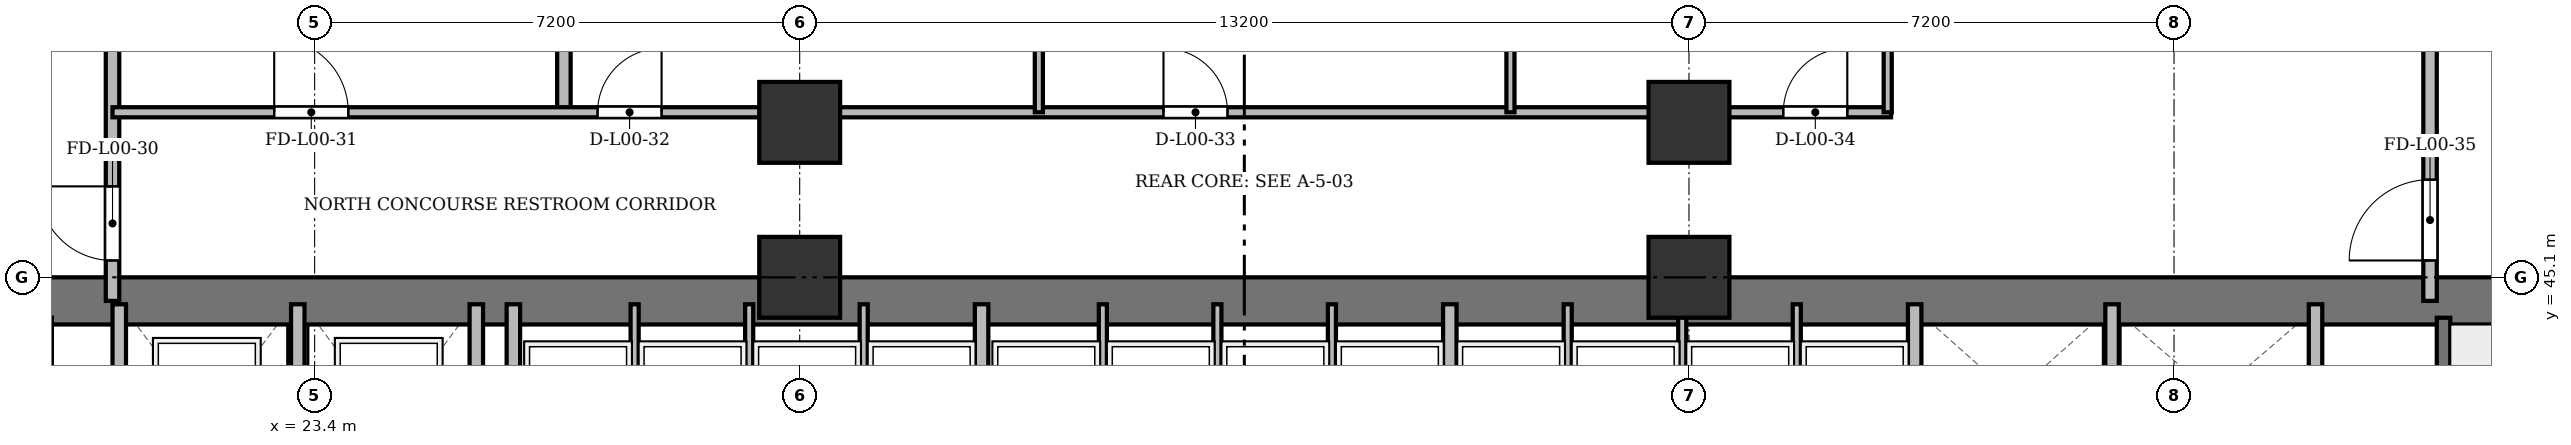
"""IFC4 building model, lengths in metres.
Left out: names, types, materials, properties, quantities, classifications, styles, units other than length and angle.
Written with IfcOpenShell. Run it as: python <this file> out.ifc"""

import sys

from ifc_helpers import new_model, si_unit, direction, frame, frame_2d, origin, origin_2d, place, context, subcontext, project, spatial, rectangle, extrude, source, transform, mapped, element, fill, save


model = new_model("IFC4")
c1 = context("Model", 3, precision=1e-05, world=origin(), true_north=direction((0.0, 1.0)))
c2 = subcontext(c1, "Body", "Model", "MODEL_VIEW")
j1 = project(units=[si_unit("LENGTHUNIT", "METRE"), si_unit("PLANEANGLEUNIT", "RADIAN")], contexts=[c1])
p1 = place(None, origin())
s1 = spatial("IfcSite", under=j1, at=p1, CompositionType="ELEMENT")
p2 = place(p1, origin())
s2 = spatial("IfcBuilding", under=s1, at=p2, CompositionType="ELEMENT")
p3 = place(p2, origin())
s3 = spatial("IfcBuildingStorey", under=s2, at=p3, CompositionType="ELEMENT", Elevation=0.0)
m1 = source(origin(), c2, "Body", "SweptSolid", [
    extrude(rectangle(XDim=1.2, YDim=1.2, at=origin_2d()), origin(), (0.0, 0.0, 1.0), 5.2),
])
for number, where, z_axis, x_axis in (
    (1, (30.6, 45.1, 0.0), (0.0, 0.0, 1.0), (1.0, 0.0, 0.0)),
    (2, (30.6, 47.4, 0.0), (0.0, 0.0, 1.0), (1.0, 0.0, 0.0)),
    (3, (43.8, 45.1, 0.0), (0.0, 0.0, 1.0), (1.0, 0.0, 0.0)),
    (4, (43.8, 47.4, 0.0), (0.0, 0.0, 1.0), (1.0, 0.0, 0.0)),
):
    element("IfcColumn", number, at=place(p3, frame(where, z_axis=z_axis, x_axis=x_axis)), inside=s3, PredefinedType="COLUMN", context=c2, shape_type="MappedRepresentation", body=[
        mapped(m1, transform((0.0, 0.0, 0.0), x_axis=(1.0, 0.0, 0.0), y_axis=(0.0, 1.0, 0.0), z_axis=(0.0, 0.0, 1.0), scale=1.0)),
    ])
p4 = place(p3, frame((15.5, 44.75, 0.0), z_axis=(0.0, 0.0, 1.0), x_axis=(1.0, 0.0, 0.0)))
e5 = element("IfcWall", 5, at=p4, inside=s3, PredefinedType="SHEAR", context=c2, shape_type="SweptSolid", body=[
    extrude(rectangle(XDim=43.4, YDim=0.7, at=frame_2d((21.7, 0.0))), origin(), (0.0, 0.0, 1.0), 4.88),
])
p5 = place(p3, frame((55.0, 33.4, 0.0), z_axis=(0.0, 0.0, 1.0), x_axis=(0.0, 1.0, 0.0)))
e6 = element("IfcWall", 6, at=p5, inside=s3, PredefinedType="SHEAR", context=c2, shape_type="SweptSolid", body=[
    extrude(rectangle(XDim=11.1, YDim=0.2, at=frame_2d((5.55, 0.0))), origin(), (0.0, 0.0, 1.0), 4.88),
])
p6 = place(p5, frame((0.85, 0.0, 0.0)))
e7 = element("IfcOpeningElement", 7, at=p6, cuts=e6, PredefinedType="OPENING", context=c2, shape_type="SweptSolid", body=[
    extrude(rectangle(XDim=1.1, YDim=2.15, at=frame_2d((0.55, 1.075))), frame((0.0, 0.11, 0.0), z_axis=(0.0, -1.0, 0.0), x_axis=(1.0, 0.0, 0.0)), (0.0, 0.0, 1.0), 0.22),
])
for number, where, z_axis, x_axis in (
    (8, (20.5, 41.3, 0.0), (0.0, 0.0, 1.0), (0.0, 1.0, 0.0)),
    (9, (23.15, 41.3, 0.0), (0.0, 0.0, 1.0), (0.0, 1.0, 0.0)),
    (10, (25.8, 41.3, 0.0), (0.0, 0.0, 1.0), (0.0, 1.0, 0.0)),
):
    element("IfcWall", number, at=place(p3, frame(where, z_axis=z_axis, x_axis=x_axis)), inside=s3, PredefinedType="SOLIDWALL", context=c2, shape_type="SweptSolid", body=[
        extrude(rectangle(XDim=3.4, YDim=0.2, at=frame_2d((1.7, 0.0))), origin(), (0.0, 0.0, 1.0), 4.88),
    ])
p7 = place(p3, frame((26.35, 33.4, 0.0), z_axis=(0.0, 0.0, 1.0), x_axis=(0.0, 1.0, 0.0)))
e11 = element("IfcWall", 11, at=p7, inside=s3, PredefinedType="SOLIDWALL", context=c2, shape_type="SweptSolid", body=[
    extrude(rectangle(XDim=11.3, YDim=0.2, at=frame_2d((5.65, 0.0))), origin(), (0.0, 0.0, 1.0), 3.78),
])
p8 = place(p3, frame((33.3, 41.5, 0.0), z_axis=(0.0, 0.0, 1.0), x_axis=(0.0, 1.0, 0.0)))
e12 = element("IfcWall", 12, at=p8, inside=s3, PredefinedType="SOLIDWALL", context=c2, shape_type="SweptSolid", body=[
    extrude(rectangle(XDim=3.2, YDim=0.2, at=frame_2d((1.6, 0.0))), origin(), (0.0, 0.0, 1.0), 4.88),
])
for number, where, z_axis, x_axis in (
    (13, (28.15, 41.5, 0.0), (0.0, 0.0, 1.0), (0.0, 1.0, 0.0)),
    (14, (29.85, 41.5, 0.0), (0.0, 0.0, 1.0), (0.0, 1.0, 0.0)),
    (15, (31.55, 41.5, 0.0), (0.0, 0.0, 1.0), (0.0, 1.0, 0.0)),
    (16, (35.1, 41.5, 0.0), (0.0, 0.0, 1.0), (0.0, 1.0, 0.0)),
    (17, (36.8, 41.5, 0.0), (0.0, 0.0, 1.0), (0.0, 1.0, 0.0)),
    (18, (38.5, 41.5, 0.0), (0.0, 0.0, 1.0), (0.0, 1.0, 0.0)),
):
    element("IfcWall", number, at=place(p3, frame(where, z_axis=z_axis, x_axis=x_axis)), inside=s3, PredefinedType="PARTITIONING", context=c2, shape_type="SweptSolid", body=[
        extrude(rectangle(XDim=3.2, YDim=0.12, at=frame_2d((1.6, 0.0))), origin(), (0.0, 0.0, 1.0), 4.88),
    ])
p9 = place(p3, frame((40.25, 41.5, 0.0), z_axis=(0.0, 0.0, 1.0), x_axis=(0.0, 1.0, 0.0)))
e19 = element("IfcWall", 19, at=p9, inside=s3, PredefinedType="SOLIDWALL", context=c2, shape_type="SweptSolid", body=[
    extrude(rectangle(XDim=3.2, YDim=0.2, at=frame_2d((1.6, 0.0))), origin(), (0.0, 0.0, 1.0), 4.88),
])
p10 = place(p3, frame((42.0, 41.5, 0.0), z_axis=(0.0, 0.0, 1.0), x_axis=(0.0, 1.0, 0.0)))
e20 = element("IfcWall", 20, at=p10, inside=s3, PredefinedType="PARTITIONING", context=c2, shape_type="SweptSolid", body=[
    extrude(rectangle(XDim=3.2, YDim=0.12, at=frame_2d((1.6, 0.0))), origin(), (0.0, 0.0, 1.0), 4.88),
])
p11 = place(p3, frame((43.7, 41.5, 0.0), z_axis=(0.0, 0.0, 1.0), x_axis=(0.0, 1.0, 0.0)))
e21 = element("IfcWall", 21, at=p11, inside=s3, PredefinedType="PARTITIONING", context=c2, shape_type="SweptSolid", body=[
    extrude(rectangle(XDim=3.2, YDim=0.12, at=frame_2d((1.6, 0.0))), origin(), (0.0, 0.0, 1.0), 4.08),
])
p12 = place(p3, frame((45.4, 41.5, 0.0), z_axis=(0.0, 0.0, 1.0), x_axis=(0.0, 1.0, 0.0)))
e22 = element("IfcWall", 22, at=p12, inside=s3, PredefinedType="PARTITIONING", context=c2, shape_type="SweptSolid", body=[
    extrude(rectangle(XDim=3.2, YDim=0.12, at=frame_2d((1.6, 0.0))), origin(), (0.0, 0.0, 1.0), 4.88),
])
p13 = place(p3, frame((47.15, 33.4, 0.0), z_axis=(0.0, 0.0, 1.0), x_axis=(0.0, 1.0, 0.0)))
e23 = element("IfcWall", 23, at=p13, inside=s3, PredefinedType="SOLIDWALL", context=c2, shape_type="SweptSolid", body=[
    extrude(rectangle(XDim=11.3, YDim=0.2, at=frame_2d((5.65, 0.0))), origin(), (0.0, 0.0, 1.0), 3.78),
])
for number, where, z_axis, x_axis in (
    (24, (50.08, 42.05, 0.0), (0.0, 0.0, 1.0), (0.0, 1.0, 0.0)),
    (25, (53.1, 42.05, 0.0), (0.0, 0.0, 1.0), (0.0, 1.0, 0.0)),
):
    element("IfcWall", number, at=place(p3, frame(where, z_axis=z_axis, x_axis=x_axis)), inside=s3, PredefinedType="SOLIDWALL", context=c2, shape_type="SweptSolid", body=[
        extrude(rectangle(XDim=2.65, YDim=0.2, at=frame_2d((1.325, 0.0))), origin(), (0.0, 0.0, 1.0), 4.88),
    ])
p14 = place(p3, frame((20.4, 44.75, 0.0), z_axis=(0.0, 0.0, 1.0), x_axis=(0.0, 1.0, 0.0)))
e26 = element("IfcWall", 26, at=p14, inside=s3, PredefinedType="PARTITIONING", context=c2, shape_type="SweptSolid", body=[
    extrude(rectangle(XDim=6.65, YDim=0.2, at=frame_2d((3.325, 0.0))), origin(), (0.0, 0.0, 1.0), 3.78),
])
p15 = place(p14, frame((0.6, 0.0, 0.0)))
e27 = element("IfcOpeningElement", 27, at=p15, cuts=e26, PredefinedType="OPENING", context=c2, shape_type="SweptSolid", body=[
    extrude(rectangle(XDim=1.1, YDim=2.15, at=frame_2d((0.55, 1.075))), frame((0.0, 0.11, 0.0), z_axis=(0.0, -1.0, 0.0), x_axis=(1.0, 0.0, 0.0)), (0.0, 0.0, 1.0), 0.22),
])
p16 = place(p3, frame((27.1, 47.55, 0.0), z_axis=(0.0, 0.0, 1.0), x_axis=(0.0, 1.0, 0.0)))
e28 = element("IfcWall", 28, at=p16, inside=s3, PredefinedType="PARTITIONING", context=c2, shape_type="SweptSolid", body=[
    extrude(rectangle(XDim=3.85, YDim=0.2, at=frame_2d((1.925, 0.0))), origin(), (0.0, 0.0, 1.0), 3.78),
])
p17 = place(p3, frame((20.4, 47.55, 0.0), z_axis=(0.0, 0.0, 1.0), x_axis=(1.0, 0.0, 0.0)))
e29 = element("IfcWall", 29, at=p17, inside=s3, PredefinedType="PARTITIONING", context=c2, shape_type="SweptSolid", body=[
    extrude(rectangle(XDim=26.4, YDim=0.15, at=frame_2d((13.2, 0.0))), origin(), (0.0, 0.0, 1.0), 3.78),
])
p18 = place(p17, frame((2.4, 0.0, 0.0)))
e30 = element("IfcOpeningElement", 30, at=p18, cuts=e29, PredefinedType="OPENING", context=c2, shape_type="SweptSolid", body=[
    extrude(rectangle(XDim=1.1, YDim=2.15, at=frame_2d((0.55, 1.075))), frame((0.0, 0.085, 0.0), z_axis=(0.0, -1.0, 0.0), x_axis=(1.0, 0.0, 0.0)), (0.0, 0.0, 1.0), 0.17),
])
p19 = place(p17, frame((7.2, 0.0, 0.0)))
e31 = element("IfcOpeningElement", 31, at=p19, cuts=e29, PredefinedType="OPENING", context=c2, shape_type="SweptSolid", body=[
    extrude(rectangle(XDim=0.95, YDim=2.15, at=frame_2d((0.475, 1.075))), frame((0.0, 0.085, 0.0), z_axis=(0.0, -1.0, 0.0), x_axis=(1.0, 0.0, 0.0)), (0.0, 0.0, 1.0), 0.17),
])
p20 = place(p17, frame((15.6, 0.0, 0.0)))
e32 = element("IfcOpeningElement", 32, at=p20, cuts=e29, PredefinedType="OPENING", context=c2, shape_type="SweptSolid", body=[
    extrude(rectangle(XDim=0.95, YDim=2.15, at=frame_2d((0.475, 1.075))), frame((0.0, 0.085, 0.0), z_axis=(0.0, -1.0, 0.0), x_axis=(1.0, 0.0, 0.0)), (0.0, 0.0, 1.0), 0.17),
])
p21 = place(p17, frame((24.8, 0.0, 0.0)))
e33 = element("IfcOpeningElement", 33, at=p21, cuts=e29, PredefinedType="OPENING", context=c2, shape_type="SweptSolid", body=[
    extrude(rectangle(XDim=0.95, YDim=2.15, at=frame_2d((0.475, 1.075))), frame((0.0, 0.085, 0.0), z_axis=(0.0, -1.0, 0.0), x_axis=(1.0, 0.0, 0.0)), (0.0, 0.0, 1.0), 0.17),
])
for number, where, z_axis, x_axis in (
    (34, (34.15, 47.55, 0.0), (0.0, 0.0, 1.0), (0.0, 1.0, 0.0)),
    (35, (41.15, 47.55, 0.0), (0.0, 0.0, 1.0), (0.0, 1.0, 0.0)),
    (36, (46.75, 47.55, 0.0), (0.0, 0.0, 1.0), (0.0, 1.0, 0.0)),
):
    element("IfcWall", number, at=place(p3, frame(where, z_axis=z_axis, x_axis=x_axis)), inside=s3, PredefinedType="PARTITIONING", context=c2, shape_type="SweptSolid", body=[
        extrude(rectangle(XDim=3.85, YDim=0.12, at=frame_2d((1.925, 0.0))), origin(), (0.0, 0.0, 1.0), 3.78),
    ])
p22 = place(p3, frame((54.8, 44.75, 0.0), z_axis=(0.0, 0.0, 1.0), x_axis=(0.0, 1.0, 0.0)))
e37 = element("IfcWall", 37, at=p22, inside=s3, PredefinedType="PARTITIONING", context=c2, shape_type="SweptSolid", body=[
    extrude(rectangle(XDim=6.65, YDim=0.2, at=frame_2d((3.325, 0.0))), origin(), (0.0, 0.0, 1.0), 3.78),
])
p23 = place(p22, frame((0.6, 0.0, 0.0)))
e38 = element("IfcOpeningElement", 38, at=p23, cuts=e37, PredefinedType="OPENING", context=c2, shape_type="SweptSolid", body=[
    extrude(rectangle(XDim=1.2, YDim=2.15, at=frame_2d((0.6, 1.075))), frame((0.0, 0.11, 0.0), z_axis=(0.0, -1.0, 0.0), x_axis=(1.0, 0.0, 0.0)), (0.0, 0.0, 1.0), 0.22),
])
m2 = source(origin(), c2, "Body", "SweptSolid", [
    extrude(rectangle(XDim=1.1, YDim=2.15, at=frame_2d((0.55, 1.075))), frame((0.0, 0.025, 0.0), z_axis=(0.0, -1.0, 0.0), x_axis=(1.0, 0.0, 0.0)), (0.0, 0.0, 1.0), 0.05),
])
p24 = place(p15, origin())
e39 = element("IfcDoor", 39, at=p24, inside=s3, OperationType="SINGLE_SWING_RIGHT", PredefinedType="DOOR", context=c2, shape_type="MappedRepresentation", body=[
    mapped(m2, transform((0.0, 0.0, 0.0), x_axis=(1.0, 0.0, 0.0), y_axis=(0.0, 1.0, 0.0), z_axis=(0.0, 0.0, 1.0), scale=1.0)),
])
fill(e27, e39)
p25 = place(p18, origin())
e40 = element("IfcDoor", 40, at=p25, inside=s3, OperationType="SINGLE_SWING_LEFT", PredefinedType="DOOR", context=c2, shape_type="MappedRepresentation", body=[
    mapped(m2, transform((0.0, 0.0, 0.0), x_axis=(1.0, 0.0, 0.0), y_axis=(0.0, 1.0, 0.0), z_axis=(0.0, 0.0, 1.0), scale=1.0)),
])
fill(e30, e40)
m3 = source(origin(), c2, "Body", "SweptSolid", [
    extrude(rectangle(XDim=0.95, YDim=2.15, at=frame_2d((0.475, 1.075))), frame((0.0, 0.025, 0.0), z_axis=(0.0, -1.0, 0.0), x_axis=(1.0, 0.0, 0.0)), (0.0, 0.0, 1.0), 0.05),
])
p26 = place(p19, origin())
e41 = element("IfcDoor", 41, at=p26, inside=s3, OperationType="SINGLE_SWING_RIGHT", PredefinedType="DOOR", context=c2, shape_type="MappedRepresentation", body=[
    mapped(m3, transform((0.0, 0.0, 0.0), x_axis=(1.0, 0.0, 0.0), y_axis=(0.0, 1.0, 0.0), z_axis=(0.0, 0.0, 1.0), scale=1.0)),
])
fill(e31, e41)
p27 = place(p20, origin())
e42 = element("IfcDoor", 42, at=p27, inside=s3, OperationType="SINGLE_SWING_LEFT", PredefinedType="DOOR", context=c2, shape_type="MappedRepresentation", body=[
    mapped(m3, transform((0.0, 0.0, 0.0), x_axis=(1.0, 0.0, 0.0), y_axis=(0.0, 1.0, 0.0), z_axis=(0.0, 0.0, 1.0), scale=1.0)),
])
fill(e32, e42)
p28 = place(p21, origin())
e43 = element("IfcDoor", 43, at=p28, inside=s3, OperationType="SINGLE_SWING_RIGHT", PredefinedType="DOOR", context=c2, shape_type="MappedRepresentation", body=[
    mapped(m3, transform((0.0, 0.0, 0.0), x_axis=(1.0, 0.0, 0.0), y_axis=(0.0, 1.0, 0.0), z_axis=(0.0, 0.0, 1.0), scale=1.0)),
])
fill(e33, e43)
m4 = source(origin(), c2, "Body", "SweptSolid", [
    extrude(rectangle(XDim=1.2, YDim=2.15, at=frame_2d((0.6, 1.075))), frame((0.0, 0.025, 0.0), z_axis=(0.0, -1.0, 0.0), x_axis=(1.0, 0.0, 0.0)), (0.0, 0.0, 1.0), 0.05),
])
p29 = place(p23, origin())
e44 = element("IfcDoor", 44, at=p29, inside=s3, OperationType="SINGLE_SWING_LEFT", PredefinedType="DOOR", context=c2, shape_type="MappedRepresentation", body=[
    mapped(m4, transform((0.0, 0.0, 0.0), x_axis=(1.0, 0.0, 0.0), y_axis=(0.0, 1.0, 0.0), z_axis=(0.0, 0.0, 1.0), scale=1.0)),
])
fill(e38, e44)
save(model, sys.argv[1])
